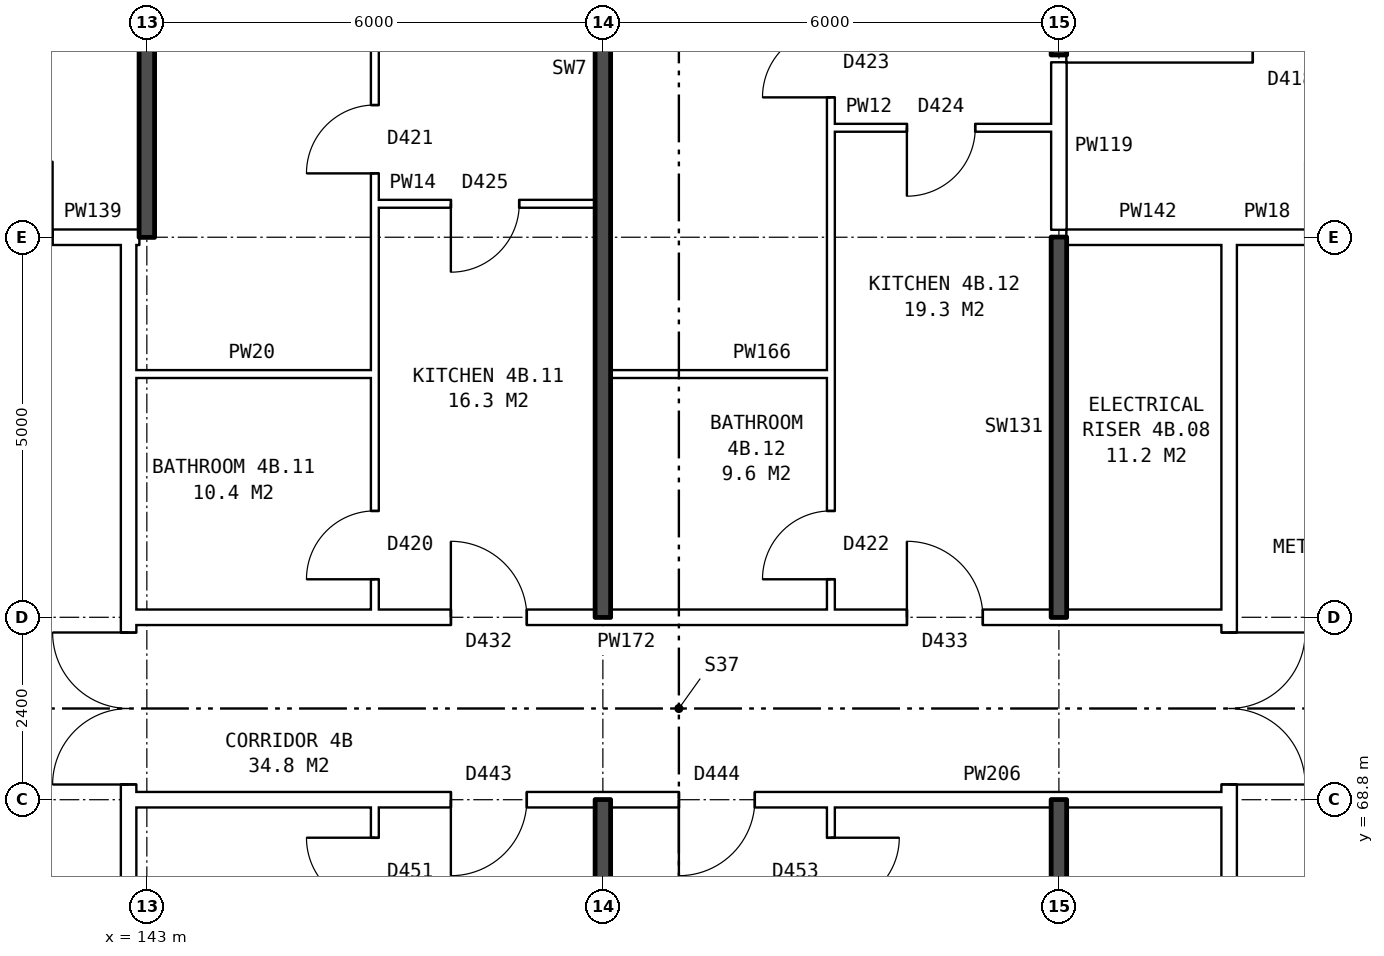
"""IFC4 building model, lengths in metres.
Left out: names, types, materials, properties, quantities, classifications, styles, units other than length and angle.
Written with IfcOpenShell. Run it as: python <this file> out.ifc"""

import sys

from ifc_helpers import new_model, si_unit, direction, frame, frame_2d, origin, place, context, subcontext, project, spatial, rectangle, extrude, element, fill, save


model = new_model("IFC4")
c1 = context("Model", 3, precision=1e-05, world=origin(), true_north=direction((0.0, 1.0)))
c2 = subcontext(c1, "Body", "Model", "MODEL_VIEW")
j1 = project(units=[si_unit("LENGTHUNIT", "METRE"), si_unit("PLANEANGLEUNIT", "RADIAN")], contexts=[c1])
p1 = place(None, origin())
s1 = spatial("IfcSite", under=j1, at=p1, CompositionType="ELEMENT")
p2 = place(p1, origin())
s2 = spatial("IfcBuilding", under=s1, at=p2, CompositionType="ELEMENT")
p3 = place(p2, frame((0.0, 0.0, 19.5)))
s3 = spatial("IfcBuildingStorey", under=s2, at=p3, CompositionType="ELEMENT", Elevation=19.5)
p4 = place(p3, frame((142.76, 63.9, 0.0), z_axis=(0.0, 0.0, 1.0), x_axis=(0.0, 1.0, 0.0)))
e1 = element("IfcWall", 1, at=p4, inside=s3, PredefinedType="PARTITIONING", context=c2, shape_type="SweptSolid", body=[
    extrude(rectangle(XDim=12.2, YDim=0.2, at=frame_2d((6.1, 0.0))), origin(), (0.0, 0.0, 1.0), 2.85),
])
p5 = place(p4, frame((5.1, 0.0, 0.0)))
e2 = element("IfcOpeningElement", 2, at=p5, cuts=e1, PredefinedType="OPENING", context=c2, shape_type="SweptSolid", body=[
    extrude(rectangle(XDim=2.0, YDim=2.1, at=frame_2d((1.0, 1.05))), frame((0.0, 0.11, 0.0), z_axis=(0.0, -1.0, 0.0), x_axis=(1.0, 0.0, 0.0)), (0.0, 0.0, 1.0), 0.22),
])
p6 = place(p3, frame((157.24, 63.9, 0.0), z_axis=(0.0, 0.0, 1.0), x_axis=(0.0, 1.0, 0.0)))
e3 = element("IfcWall", 3, at=p6, inside=s3, PredefinedType="PARTITIONING", context=c2, shape_type="SweptSolid", body=[
    extrude(rectangle(XDim=12.2, YDim=0.2, at=frame_2d((6.1, 0.0))), origin(), (0.0, 0.0, 1.0), 2.85),
])
p7 = place(p6, frame((5.1, 0.0, 0.0)))
e4 = element("IfcOpeningElement", 4, at=p7, cuts=e3, PredefinedType="OPENING", context=c2, shape_type="SweptSolid", body=[
    extrude(rectangle(XDim=2.0, YDim=2.1, at=frame_2d((1.0, 1.05))), frame((0.0, 0.11, 0.0), z_axis=(0.0, -1.0, 0.0), x_axis=(1.0, 0.0, 0.0)), (0.0, 0.0, 1.0), 0.22),
])
p8 = place(p3, frame((142.76, 68.8, 0.0), z_axis=(0.0, 0.0, 1.0), x_axis=(1.0, 0.0, 0.0)))
e5 = element("IfcWall", 5, at=p8, inside=s3, PredefinedType="PARTITIONING", context=c2, shape_type="SweptSolid", body=[
    extrude(rectangle(XDim=14.48, YDim=0.2, at=frame_2d((7.24, 0.0))), origin(), (0.0, 0.0, 1.0), 2.85),
])
p9 = place(p8, frame((4.24, 0.0, 0.0)))
e6 = element("IfcOpeningElement", 6, at=p9, cuts=e5, PredefinedType="OPENING", context=c2, shape_type="SweptSolid", body=[
    extrude(rectangle(XDim=1.0, YDim=2.1, at=frame_2d((0.5, 1.05))), frame((0.0, 0.11, 0.0), z_axis=(0.0, -1.0, 0.0), x_axis=(1.0, 0.0, 0.0)), (0.0, 0.0, 1.0), 0.22),
])
p10 = place(p8, frame((7.24, 0.0, 0.0)))
e7 = element("IfcOpeningElement", 7, at=p10, cuts=e5, PredefinedType="OPENING", context=c2, shape_type="SweptSolid", body=[
    extrude(rectangle(XDim=1.0, YDim=2.1, at=frame_2d((0.5, 1.05))), frame((0.0, 0.11, 0.0), z_axis=(0.0, -1.0, 0.0), x_axis=(1.0, 0.0, 0.0)), (0.0, 0.0, 1.0), 0.22),
])
p11 = place(p3, frame((142.76, 71.2, 0.0), z_axis=(0.0, 0.0, 1.0), x_axis=(1.0, 0.0, 0.0)))
e8 = element("IfcWall", 8, at=p11, inside=s3, PredefinedType="PARTITIONING", context=c2, shape_type="SweptSolid", body=[
    extrude(rectangle(XDim=14.48, YDim=0.2, at=frame_2d((7.24, 0.0))), origin(), (0.0, 0.0, 1.0), 2.85),
])
p12 = place(p11, frame((4.24, 0.0, 0.0)))
e9 = element("IfcOpeningElement", 9, at=p12, cuts=e8, PredefinedType="OPENING", context=c2, shape_type="SweptSolid", body=[
    extrude(rectangle(XDim=1.0, YDim=2.1, at=frame_2d((0.5, 1.05))), frame((0.0, 0.11, 0.0), z_axis=(0.0, -1.0, 0.0), x_axis=(1.0, 0.0, 0.0)), (0.0, 0.0, 1.0), 0.22),
])
p13 = place(p11, frame((10.24, 0.0, 0.0)))
e10 = element("IfcOpeningElement", 10, at=p13, cuts=e8, PredefinedType="OPENING", context=c2, shape_type="SweptSolid", body=[
    extrude(rectangle(XDim=1.0, YDim=2.1, at=frame_2d((0.5, 1.05))), frame((0.0, 0.11, 0.0), z_axis=(0.0, -1.0, 0.0), x_axis=(1.0, 0.0, 0.0)), (0.0, 0.0, 1.0), 0.22),
])
p14 = place(p3, frame((142.76, 74.4, 0.0), z_axis=(0.0, 0.0, 1.0), x_axis=(1.0, 0.0, 0.0)))
e11 = element("IfcWall", 11, at=p14, inside=s3, PredefinedType="PARTITIONING", context=c2, shape_type="SweptSolid", body=[
    extrude(rectangle(XDim=3.24, YDim=0.1, at=frame_2d((1.62, 0.0))), origin(), (0.0, 0.0, 1.0), 2.85),
])
p15 = place(p3, frame((149.1, 74.4, 0.0), z_axis=(0.0, 0.0, 1.0), x_axis=(1.0, 0.0, 0.0)))
e12 = element("IfcWall", 12, at=p15, inside=s3, PredefinedType="PARTITIONING", context=c2, shape_type="SweptSolid", body=[
    extrude(rectangle(XDim=2.9, YDim=0.1, at=frame_2d((1.45, 0.0))), origin(), (0.0, 0.0, 1.0), 2.85),
])
p16 = place(p3, frame((139.76, 76.2, 0.0), z_axis=(0.0, 0.0, 1.0), x_axis=(1.0, 0.0, 0.0)))
e13 = element("IfcWall", 13, at=p16, inside=s3, PredefinedType="PARTITIONING", context=c2, shape_type="SweptSolid", body=[
    extrude(rectangle(XDim=3.0, YDim=0.2, at=frame_2d((1.5, 0.0))), origin(), (0.0, 0.0, 1.0), 2.85),
])
p17 = place(p16, frame((1.0, 0.0, 0.0)))
e14 = element("IfcOpeningElement", 14, at=p17, cuts=e13, PredefinedType="OPENING", context=c2, shape_type="SweptSolid", body=[
    extrude(rectangle(XDim=1.0, YDim=2.1, at=frame_2d((0.5, 1.05))), frame((0.0, 0.11, 0.0), z_axis=(0.0, -1.0, 0.0), x_axis=(1.0, 0.0, 0.0)), (0.0, 0.0, 1.0), 0.22),
])
p18 = place(p3, frame((142.76, 76.2, 0.0), z_axis=(0.0, 0.0, 1.0), x_axis=(1.0, 0.0, 0.0)))
e15 = element("IfcWall", 15, at=p18, inside=s3, PredefinedType="PARTITIONING", context=c2, shape_type="SweptSolid", body=[
    extrude(rectangle(XDim=0.14, YDim=0.2, at=frame_2d((0.07, 0.0))), origin(), (0.0, 0.0, 1.0), 2.85),
])
p19 = place(p3, frame((155.1, 76.2, 0.0), z_axis=(0.0, 0.0, 1.0), x_axis=(1.0, 0.0, 0.0)))
e16 = element("IfcWall", 16, at=p19, inside=s3, PredefinedType="PARTITIONING", context=c2, shape_type="SweptSolid", body=[
    extrude(rectangle(XDim=2.14, YDim=0.2, at=frame_2d((1.07, 0.0))), origin(), (0.0, 0.0, 1.0), 2.85),
])
p20 = place(p3, frame((157.24, 76.2, 0.0), z_axis=(0.0, 0.0, 1.0), x_axis=(1.0, 0.0, 0.0)))
e17 = element("IfcWall", 17, at=p20, inside=s3, PredefinedType="PARTITIONING", context=c2, shape_type="SweptSolid", body=[
    extrude(rectangle(XDim=3.0, YDim=0.2, at=frame_2d((1.5, 0.0))), origin(), (0.0, 0.0, 1.0), 2.85),
])
p21 = place(p20, frame((1.0, 0.0, 0.0)))
e18 = element("IfcOpeningElement", 18, at=p21, cuts=e17, PredefinedType="OPENING", context=c2, shape_type="SweptSolid", body=[
    extrude(rectangle(XDim=1.0, YDim=2.1, at=frame_2d((0.5, 1.05))), frame((0.0, 0.11, 0.0), z_axis=(0.0, -1.0, 0.0), x_axis=(1.0, 0.0, 0.0)), (0.0, 0.0, 1.0), 0.22),
])
p22 = place(p3, frame((146.0, 76.64, 0.0), z_axis=(0.0, 0.0, 1.0), x_axis=(1.0, 0.0, 0.0)))
e19 = element("IfcWall", 19, at=p22, inside=s3, PredefinedType="PARTITIONING", context=c2, shape_type="SweptSolid", body=[
    extrude(rectangle(XDim=2.9, YDim=0.1, at=frame_2d((1.45, 0.0))), origin(), (0.0, 0.0, 1.0), 2.85),
])
p23 = place(p22, frame((1.0, 0.0, 0.0)))
e20 = element("IfcOpeningElement", 20, at=p23, cuts=e19, PredefinedType="OPENING", context=c2, shape_type="SweptSolid", body=[
    extrude(rectangle(XDim=0.9, YDim=2.1, at=frame_2d((0.45, 1.05))), frame((0.0, 0.06, 0.0), z_axis=(0.0, -1.0, 0.0), x_axis=(1.0, 0.0, 0.0)), (0.0, 0.0, 1.0), 0.12),
])
p24 = place(p3, frame((152.0, 77.64, 0.0), z_axis=(0.0, 0.0, 1.0), x_axis=(1.0, 0.0, 0.0)))
e21 = element("IfcWall", 21, at=p24, inside=s3, PredefinedType="PARTITIONING", context=c2, shape_type="SweptSolid", body=[
    extrude(rectangle(XDim=2.9, YDim=0.1, at=frame_2d((1.45, 0.0))), origin(), (0.0, 0.0, 1.0), 2.85),
])
p25 = place(p24, frame((1.0, 0.0, 0.0)))
e22 = element("IfcOpeningElement", 22, at=p25, cuts=e21, PredefinedType="OPENING", context=c2, shape_type="SweptSolid", body=[
    extrude(rectangle(XDim=0.9, YDim=2.1, at=frame_2d((0.45, 1.05))), frame((0.0, 0.06, 0.0), z_axis=(0.0, -1.0, 0.0), x_axis=(1.0, 0.0, 0.0)), (0.0, 0.0, 1.0), 0.12),
])
p26 = place(p3, frame((155.1, 78.6, 0.0), z_axis=(0.0, 0.0, 1.0), x_axis=(1.0, 0.0, 0.0)))
e23 = element("IfcWall", 23, at=p26, inside=s3, PredefinedType="PARTITIONING", context=c2, shape_type="SweptSolid", body=[
    extrude(rectangle(XDim=22.29, YDim=0.2, at=frame_2d((11.145, 0.0))), origin(), (0.0, 0.0, 1.0), 2.85),
])
p27 = place(p26, frame((2.45, 0.0, 0.0)))
e24 = element("IfcOpeningElement", 24, at=p27, cuts=e23, PredefinedType="OPENING", context=c2, shape_type="SweptSolid", body=[
    extrude(rectangle(XDim=1.0, YDim=2.1, at=frame_2d((0.5, 1.05))), frame((0.0, 0.11, 0.0), z_axis=(0.0, -1.0, 0.0), x_axis=(1.0, 0.0, 0.0)), (0.0, 0.0, 1.0), 0.22),
])
p28 = place(p26, frame((14.4, 0.0, 0.0)))
e25 = element("IfcOpeningElement", 25, at=p28, cuts=e23, PredefinedType="OPENING", context=c2, shape_type="SweptSolid", body=[
    extrude(rectangle(XDim=1.0, YDim=2.1, at=frame_2d((0.5, 1.05))), frame((0.0, 0.11, 0.0), z_axis=(0.0, -1.0, 0.0), x_axis=(1.0, 0.0, 0.0)), (0.0, 0.0, 1.0), 0.22),
])
p29 = place(p3, frame((143.0, 76.2, 0.0), z_axis=(0.0, 0.0, 1.0), x_axis=(0.0, 1.0, 0.0)))
e26 = element("IfcWall", 26, at=p29, inside=s3, PredefinedType="SOLIDWALL", context=c2, shape_type="SweptSolid", body=[
    extrude(rectangle(XDim=9.44, YDim=0.2, at=frame_2d((4.72, 0.0))), origin(), (0.0, 0.0, 1.0), 2.85),
])
p30 = place(p3, frame((146.0, 54.36, 0.0), z_axis=(0.0, 0.0, 1.0), x_axis=(0.0, 1.0, 0.0)))
e27 = element("IfcWall", 27, at=p30, inside=s3, PredefinedType="PARTITIONING", context=c2, shape_type="SweptSolid", body=[
    extrude(rectangle(XDim=14.34, YDim=0.1, at=frame_2d((7.17, 0.0))), origin(), (0.0, 0.0, 1.0), 2.85),
])
p31 = place(p30, frame((7.7, 0.0, 0.0)))
e28 = element("IfcOpeningElement", 28, at=p31, cuts=e27, PredefinedType="OPENING", context=c2, shape_type="SweptSolid", body=[
    extrude(rectangle(XDim=0.9, YDim=2.1, at=frame_2d((0.45, 1.05))), frame((0.0, 0.06, 0.0), z_axis=(0.0, -1.0, 0.0), x_axis=(1.0, 0.0, 0.0)), (0.0, 0.0, 1.0), 0.12),
])
p32 = place(p30, frame((13.04, 0.0, 0.0)))
e29 = element("IfcOpeningElement", 29, at=p32, cuts=e27, PredefinedType="OPENING", context=c2, shape_type="SweptSolid", body=[
    extrude(rectangle(XDim=0.9, YDim=2.1, at=frame_2d((0.45, 1.05))), frame((0.0, 0.06, 0.0), z_axis=(0.0, -1.0, 0.0), x_axis=(1.0, 0.0, 0.0)), (0.0, 0.0, 1.0), 0.12),
])
p33 = place(p3, frame((146.0, 71.3, 0.0), z_axis=(0.0, 0.0, 1.0), x_axis=(0.0, 1.0, 0.0)))
e30 = element("IfcWall", 30, at=p33, inside=s3, PredefinedType="PARTITIONING", context=c2, shape_type="SweptSolid", body=[
    extrude(rectangle(XDim=14.34, YDim=0.1, at=frame_2d((7.17, 0.0))), origin(), (0.0, 0.0, 1.0), 2.85),
])
p34 = place(p33, frame((5.74, 0.0, 0.0)))
e31 = element("IfcOpeningElement", 31, at=p34, cuts=e30, PredefinedType="OPENING", context=c2, shape_type="SweptSolid", body=[
    extrude(rectangle(XDim=0.9, YDim=2.1, at=frame_2d((0.45, 1.05))), frame((0.0, 0.06, 0.0), z_axis=(0.0, -1.0, 0.0), x_axis=(1.0, 0.0, 0.0)), (0.0, 0.0, 1.0), 0.12),
])
p35 = place(p33, frame((0.4, 0.0, 0.0)))
e32 = element("IfcOpeningElement", 32, at=p35, cuts=e30, PredefinedType="OPENING", context=c2, shape_type="SweptSolid", body=[
    extrude(rectangle(XDim=0.9, YDim=2.1, at=frame_2d((0.45, 1.05))), frame((0.0, 0.06, 0.0), z_axis=(0.0, -1.0, 0.0), x_axis=(1.0, 0.0, 0.0)), (0.0, 0.0, 1.0), 0.12),
])
for number, where, z_axis, x_axis in (
    (33, (149.0, 54.36, 0.0), (0.0, 0.0, 1.0), (0.0, 1.0, 0.0)),
    (34, (149.0, 71.2, 0.0), (0.0, 0.0, 1.0), (0.0, 1.0, 0.0)),
):
    element("IfcWall", number, at=place(p3, frame(where, z_axis=z_axis, x_axis=x_axis)), inside=s3, PredefinedType="SOLIDWALL", context=c2, shape_type="SweptSolid", body=[
        extrude(rectangle(XDim=14.44, YDim=0.2, at=frame_2d((7.22, 0.0))), origin(), (0.0, 0.0, 1.0), 2.85),
    ])
p36 = place(p3, frame((152.0, 54.36, 0.0), z_axis=(0.0, 0.0, 1.0), x_axis=(0.0, 1.0, 0.0)))
e35 = element("IfcWall", 35, at=p36, inside=s3, PredefinedType="PARTITIONING", context=c2, shape_type="SweptSolid", body=[
    extrude(rectangle(XDim=14.34, YDim=0.1, at=frame_2d((7.17, 0.0))), origin(), (0.0, 0.0, 1.0), 2.85),
])
p37 = place(p36, frame((4.2, 0.0, 0.0)))
e36 = element("IfcOpeningElement", 36, at=p37, cuts=e35, PredefinedType="OPENING", context=c2, shape_type="SweptSolid", body=[
    extrude(rectangle(XDim=0.9, YDim=2.1, at=frame_2d((0.45, 1.05))), frame((0.0, 0.06, 0.0), z_axis=(0.0, -1.0, 0.0), x_axis=(1.0, 0.0, 0.0)), (0.0, 0.0, 1.0), 0.12),
])
p38 = place(p36, frame((13.04, 0.0, 0.0)))
e37 = element("IfcOpeningElement", 37, at=p38, cuts=e35, PredefinedType="OPENING", context=c2, shape_type="SweptSolid", body=[
    extrude(rectangle(XDim=0.9, YDim=2.1, at=frame_2d((0.45, 1.05))), frame((0.0, 0.06, 0.0), z_axis=(0.0, -1.0, 0.0), x_axis=(1.0, 0.0, 0.0)), (0.0, 0.0, 1.0), 0.12),
])
p39 = place(p3, frame((152.0, 71.3, 0.0), z_axis=(0.0, 0.0, 1.0), x_axis=(0.0, 1.0, 0.0)))
e38 = element("IfcWall", 38, at=p39, inside=s3, PredefinedType="PARTITIONING", context=c2, shape_type="SweptSolid", body=[
    extrude(rectangle(XDim=14.34, YDim=0.1, at=frame_2d((7.17, 0.0))), origin(), (0.0, 0.0, 1.0), 2.85),
])
p40 = place(p39, frame((6.74, 0.0, 0.0)))
e39 = element("IfcOpeningElement", 39, at=p40, cuts=e38, PredefinedType="OPENING", context=c2, shape_type="SweptSolid", body=[
    extrude(rectangle(XDim=0.9, YDim=2.1, at=frame_2d((0.45, 1.05))), frame((0.0, 0.06, 0.0), z_axis=(0.0, -1.0, 0.0), x_axis=(1.0, 0.0, 0.0)), (0.0, 0.0, 1.0), 0.12),
])
p41 = place(p39, frame((0.4, 0.0, 0.0)))
e40 = element("IfcOpeningElement", 40, at=p41, cuts=e38, PredefinedType="OPENING", context=c2, shape_type="SweptSolid", body=[
    extrude(rectangle(XDim=0.9, YDim=2.1, at=frame_2d((0.45, 1.05))), frame((0.0, 0.06, 0.0), z_axis=(0.0, -1.0, 0.0), x_axis=(1.0, 0.0, 0.0)), (0.0, 0.0, 1.0), 0.12),
])
for number, where, z_axis, x_axis in (
    (41, (155.0, 63.8, 0.0), (0.0, 0.0, 1.0), (0.0, 1.0, 0.0)),
    (42, (155.0, 71.2, 0.0), (0.0, 0.0, 1.0), (0.0, 1.0, 0.0)),
):
    element("IfcWall", number, at=place(p3, frame(where, z_axis=z_axis, x_axis=x_axis)), inside=s3, PredefinedType="SOLIDWALL", context=c2, shape_type="SweptSolid", body=[
        extrude(rectangle(XDim=5.0, YDim=0.2, at=frame_2d((2.5, 0.0))), origin(), (0.0, 0.0, 1.0), 2.85),
    ])
p42 = place(p3, frame((155.0, 76.3, 0.0), z_axis=(0.0, 0.0, 1.0), x_axis=(0.0, 1.0, 0.0)))
e43 = element("IfcWall", 43, at=p42, inside=s3, PredefinedType="PARTITIONING", context=c2, shape_type="SweptSolid", body=[
    extrude(rectangle(XDim=2.2, YDim=0.2, at=frame_2d((1.1, 0.0))), origin(), (0.0, 0.0, 1.0), 2.85),
])
p43 = place(p3, frame((155.0, 78.6, 0.0), z_axis=(0.0, 0.0, 1.0), x_axis=(0.0, 1.0, 0.0)))
e44 = element("IfcWall", 44, at=p43, inside=s3, PredefinedType="SOLIDWALL", context=c2, shape_type="SweptSolid", body=[
    extrude(rectangle(XDim=7.04, YDim=0.2, at=frame_2d((3.52, 0.0))), origin(), (0.0, 0.0, 1.0), 2.85),
])
p44 = place(p5, origin())
e45 = element("IfcDoor", 45, at=p44, inside=s3, OperationType="DOUBLE_DOOR_SINGLE_SWING", PredefinedType="DOOR", context=c2, shape_type="SweptSolid", body=[
    extrude(rectangle(XDim=2.0, YDim=2.1, at=frame_2d((1.0, 1.05))), frame((0.0, 0.025, 0.0), z_axis=(0.0, -1.0, 0.0), x_axis=(1.0, 0.0, 0.0)), (0.0, 0.0, 1.0), 0.05),
])
fill(e2, e45)
p45 = place(p7, frame((2.0, 0.0, 0.0), z_axis=(0.0, 0.0, 1.0), x_axis=(-1.0, 0.0, 0.0)))
e46 = element("IfcDoor", 46, at=p45, inside=s3, OperationType="DOUBLE_DOOR_SINGLE_SWING", PredefinedType="DOOR", context=c2, shape_type="SweptSolid", body=[
    extrude(rectangle(XDim=2.0, YDim=2.1, at=frame_2d((1.0, 1.05))), frame((0.0, 0.025, 0.0), z_axis=(0.0, -1.0, 0.0), x_axis=(1.0, 0.0, 0.0)), (0.0, 0.0, 1.0), 0.05),
])
fill(e4, e46)
p46 = place(p9, frame((1.0, 0.0, 0.0), z_axis=(0.0, 0.0, 1.0), x_axis=(-1.0, 0.0, 0.0)))
e47 = element("IfcDoor", 47, at=p46, inside=s3, OperationType="SINGLE_SWING_RIGHT", PredefinedType="DOOR", context=c2, shape_type="SweptSolid", body=[
    extrude(rectangle(XDim=1.0, YDim=2.1, at=frame_2d((0.5, 1.05))), frame((0.0, 0.025, 0.0), z_axis=(0.0, -1.0, 0.0), x_axis=(1.0, 0.0, 0.0)), (0.0, 0.0, 1.0), 0.05),
])
fill(e6, e47)
p47 = place(p32, origin())
e48 = element("IfcDoor", 48, at=p47, inside=s3, OperationType="SINGLE_SWING_RIGHT", PredefinedType="DOOR", context=c2, shape_type="SweptSolid", body=[
    extrude(rectangle(XDim=0.9, YDim=2.1, at=frame_2d((0.45, 1.05))), frame((0.0, 0.025, 0.0), z_axis=(0.0, -1.0, 0.0), x_axis=(1.0, 0.0, 0.0)), (0.0, 0.0, 1.0), 0.05),
])
fill(e29, e48)
p48 = place(p10, frame((1.0, 0.0, 0.0), z_axis=(0.0, 0.0, 1.0), x_axis=(-1.0, 0.0, 0.0)))
e49 = element("IfcDoor", 49, at=p48, inside=s3, OperationType="SINGLE_SWING_RIGHT", PredefinedType="DOOR", context=c2, shape_type="SweptSolid", body=[
    extrude(rectangle(XDim=1.0, YDim=2.1, at=frame_2d((0.5, 1.05))), frame((0.0, 0.025, 0.0), z_axis=(0.0, -1.0, 0.0), x_axis=(1.0, 0.0, 0.0)), (0.0, 0.0, 1.0), 0.05),
])
fill(e7, e49)
p49 = place(p38, frame((0.9, 0.0, 0.0), z_axis=(0.0, 0.0, 1.0), x_axis=(-1.0, 0.0, 0.0)))
e50 = element("IfcDoor", 50, at=p49, inside=s3, OperationType="SINGLE_SWING_LEFT", PredefinedType="DOOR", context=c2, shape_type="SweptSolid", body=[
    extrude(rectangle(XDim=0.9, YDim=2.1, at=frame_2d((0.45, 1.05))), frame((0.0, 0.025, 0.0), z_axis=(0.0, -1.0, 0.0), x_axis=(1.0, 0.0, 0.0)), (0.0, 0.0, 1.0), 0.05),
])
fill(e37, e50)
p50 = place(p34, origin())
e51 = element("IfcDoor", 51, at=p50, inside=s3, OperationType="SINGLE_SWING_LEFT", PredefinedType="DOOR", context=c2, shape_type="SweptSolid", body=[
    extrude(rectangle(XDim=0.9, YDim=2.1, at=frame_2d((0.45, 1.05))), frame((0.0, 0.025, 0.0), z_axis=(0.0, -1.0, 0.0), x_axis=(1.0, 0.0, 0.0)), (0.0, 0.0, 1.0), 0.05),
])
fill(e31, e51)
p51 = place(p12, origin())
e52 = element("IfcDoor", 52, at=p51, inside=s3, OperationType="SINGLE_SWING_LEFT", PredefinedType="DOOR", context=c2, shape_type="SweptSolid", body=[
    extrude(rectangle(XDim=1.0, YDim=2.1, at=frame_2d((0.5, 1.05))), frame((0.0, 0.025, 0.0), z_axis=(0.0, -1.0, 0.0), x_axis=(1.0, 0.0, 0.0)), (0.0, 0.0, 1.0), 0.05),
])
fill(e9, e52)
p52 = place(p23, frame((0.9, 0.0, 0.0), z_axis=(0.0, 0.0, 1.0), x_axis=(-1.0, 0.0, 0.0)))
e53 = element("IfcDoor", 53, at=p52, inside=s3, OperationType="SINGLE_SWING_RIGHT", PredefinedType="DOOR", context=c2, shape_type="SweptSolid", body=[
    extrude(rectangle(XDim=0.9, YDim=2.1, at=frame_2d((0.45, 1.05))), frame((0.0, 0.025, 0.0), z_axis=(0.0, -1.0, 0.0), x_axis=(1.0, 0.0, 0.0)), (0.0, 0.0, 1.0), 0.05),
])
fill(e20, e53)
p53 = place(p35, origin())
e54 = element("IfcDoor", 54, at=p53, inside=s3, OperationType="SINGLE_SWING_LEFT", PredefinedType="DOOR", context=c2, shape_type="SweptSolid", body=[
    extrude(rectangle(XDim=0.9, YDim=2.1, at=frame_2d((0.45, 1.05))), frame((0.0, 0.025, 0.0), z_axis=(0.0, -1.0, 0.0), x_axis=(1.0, 0.0, 0.0)), (0.0, 0.0, 1.0), 0.05),
])
fill(e32, e54)
p54 = place(p40, origin())
e55 = element("IfcDoor", 55, at=p54, inside=s3, OperationType="SINGLE_SWING_LEFT", PredefinedType="DOOR", context=c2, shape_type="SweptSolid", body=[
    extrude(rectangle(XDim=0.9, YDim=2.1, at=frame_2d((0.45, 1.05))), frame((0.0, 0.025, 0.0), z_axis=(0.0, -1.0, 0.0), x_axis=(1.0, 0.0, 0.0)), (0.0, 0.0, 1.0), 0.05),
])
fill(e39, e55)
p55 = place(p13, origin())
e56 = element("IfcDoor", 56, at=p55, inside=s3, OperationType="SINGLE_SWING_LEFT", PredefinedType="DOOR", context=c2, shape_type="SweptSolid", body=[
    extrude(rectangle(XDim=1.0, YDim=2.1, at=frame_2d((0.5, 1.05))), frame((0.0, 0.025, 0.0), z_axis=(0.0, -1.0, 0.0), x_axis=(1.0, 0.0, 0.0)), (0.0, 0.0, 1.0), 0.05),
])
fill(e10, e56)
p56 = place(p25, frame((0.9, 0.0, 0.0), z_axis=(0.0, 0.0, 1.0), x_axis=(-1.0, 0.0, 0.0)))
e57 = element("IfcDoor", 57, at=p56, inside=s3, OperationType="SINGLE_SWING_RIGHT", PredefinedType="DOOR", context=c2, shape_type="SweptSolid", body=[
    extrude(rectangle(XDim=0.9, YDim=2.1, at=frame_2d((0.45, 1.05))), frame((0.0, 0.025, 0.0), z_axis=(0.0, -1.0, 0.0), x_axis=(1.0, 0.0, 0.0)), (0.0, 0.0, 1.0), 0.05),
])
fill(e22, e57)
p57 = place(p41, origin())
e58 = element("IfcDoor", 58, at=p57, inside=s3, OperationType="SINGLE_SWING_LEFT", PredefinedType="DOOR", context=c2, shape_type="SweptSolid", body=[
    extrude(rectangle(XDim=0.9, YDim=2.1, at=frame_2d((0.45, 1.05))), frame((0.0, 0.025, 0.0), z_axis=(0.0, -1.0, 0.0), x_axis=(1.0, 0.0, 0.0)), (0.0, 0.0, 1.0), 0.05),
])
fill(e40, e58)
p58 = place(p27, origin())
e59 = element("IfcDoor", 59, at=p58, inside=s3, OperationType="SINGLE_SWING_RIGHT", PredefinedType="DOOR", context=c2, shape_type="SweptSolid", body=[
    extrude(rectangle(XDim=1.0, YDim=2.1, at=frame_2d((0.5, 1.05))), frame((0.0, 0.025, 0.0), z_axis=(0.0, -1.0, 0.0), x_axis=(1.0, 0.0, 0.0)), (0.0, 0.0, 1.0), 0.05),
])
fill(e24, e59)
save(model, sys.argv[1])
